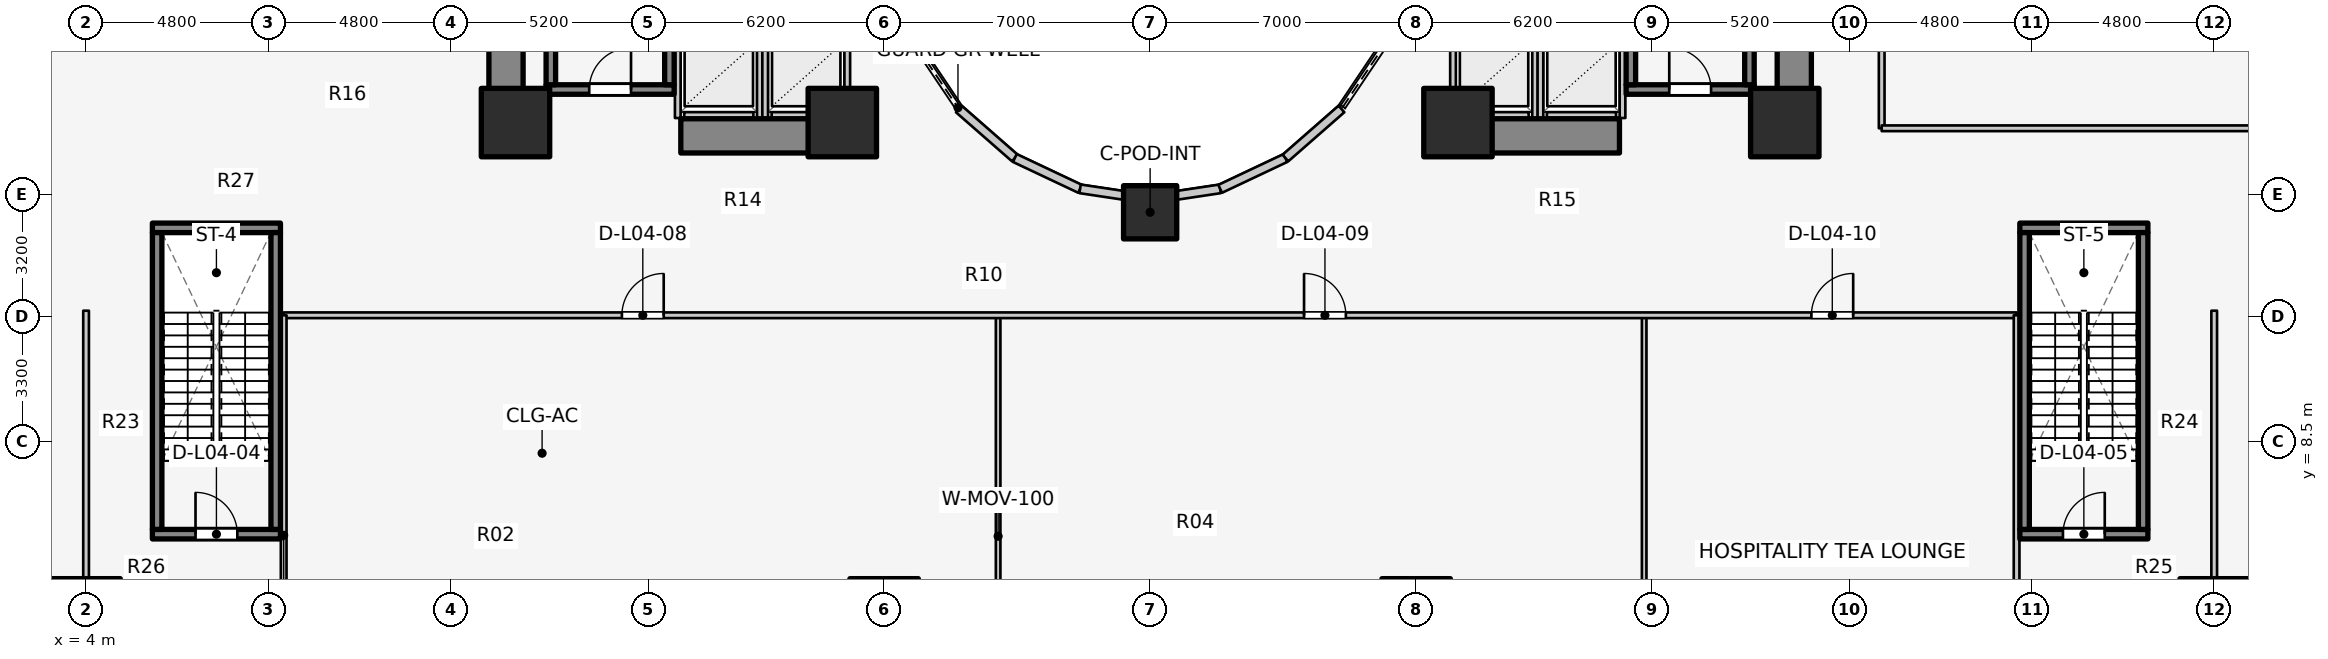
"""IFC4 building model, lengths in metres.
Left out: names, types, materials, properties, quantities, classifications, styles, units other than length and angle.
Written with IfcOpenShell. Run it as: python <this file> out.ifc"""

import sys

from ifc_helpers import new_model, si_unit, direction, frame, frame_2d, origin, origin_2d, place, context, subcontext, project, spatial, rectangle, extrude, element, fill, save


model = new_model("IFC4")
c1 = context("Model", 3, precision=1e-05, world=origin(), true_north=direction((0.0, 1.0)))
c2 = subcontext(c1, "Body", "Model", "MODEL_VIEW")
j1 = project(units=[si_unit("LENGTHUNIT", "METRE"), si_unit("PLANEANGLEUNIT", "RADIAN")], contexts=[c1])
p1 = place(None, origin())
s1 = spatial("IfcSite", under=j1, at=p1, CompositionType="ELEMENT")
p2 = place(p1, origin())
s2 = spatial("IfcBuilding", under=s1, at=p2, CompositionType="ELEMENT")
p3 = place(p2, frame((0.0, 0.0, 13.8)))
s3 = spatial("IfcBuildingStorey", under=s2, at=p3, CompositionType="ELEMENT", Elevation=13.8)
p4 = place(p3, frame((15.05, 17.05, 0.0), z_axis=(0.0, 0.0, 1.0), x_axis=(0.0, 1.0, 0.0)))
e1 = element("IfcWall", 1, at=p4, inside=s3, PredefinedType="SHEAR", context=c2, shape_type="SweptSolid", body=[
    extrude(rectangle(XDim=12.8, YDim=0.9, at=frame_2d((6.4, 0.0))), origin(), (0.0, 0.0, 1.0), 4.6),
])
p5 = place(p3, frame((19.65, 16.55, 0.0), z_axis=(0.0, 0.0, 1.0), x_axis=(1.0, 0.0, 0.0)))
e2 = element("IfcWall", 2, at=p5, inside=s3, PredefinedType="SHEAR", context=c2, shape_type="SweptSolid", body=[
    extrude(rectangle(XDim=4.5, YDim=0.9, at=frame_2d((2.25, 0.0))), origin(), (0.0, 0.0, 1.0), 4.6),
])
p6 = place(p3, frame((48.95, 17.05, 0.0), z_axis=(0.0, 0.0, 1.0), x_axis=(0.0, 1.0, 0.0)))
e3 = element("IfcWall", 3, at=p6, inside=s3, PredefinedType="SHEAR", context=c2, shape_type="SweptSolid", body=[
    extrude(rectangle(XDim=12.8, YDim=0.9, at=frame_2d((6.4, 0.0))), origin(), (0.0, 0.0, 1.0), 4.6),
])
p7 = place(p3, frame((39.85, 16.55, 0.0), z_axis=(0.0, 0.0, 1.0), x_axis=(1.0, 0.0, 0.0)))
e4 = element("IfcWall", 4, at=p7, inside=s3, PredefinedType="SHEAR", context=c2, shape_type="SweptSolid", body=[
    extrude(rectangle(XDim=4.5, YDim=0.9, at=frame_2d((2.25, 0.0))), origin(), (0.0, 0.0, 1.0), 4.6),
])
p8 = place(p3, frame((16.105, 17.77, 0.0), z_axis=(0.0, 0.0, 1.0), x_axis=(1.0, 0.0, 0.0)))
e5 = element("IfcWall", 5, at=p8, inside=s3, PredefinedType="SOLIDWALL", context=c2, shape_type="SweptSolid", body=[
    extrude(rectangle(XDim=3.37, YDim=0.25, at=frame_2d((1.685, 0.0))), origin(), (0.0, 0.0, 1.0), 4.6),
])
p9 = place(p8, frame((1.135, 0.0, 0.0)))
e6 = element("IfcOpeningElement", 6, at=p9, cuts=e5, PredefinedType="OPENING", context=c2, shape_type="SweptSolid", body=[
    extrude(rectangle(XDim=1.1, YDim=2.1, at=frame_2d((0.55, 1.05))), frame((0.0, 0.135, 0.0), z_axis=(0.0, -1.0, 0.0), x_axis=(1.0, 0.0, 0.0)), (0.0, 0.0, 1.0), 0.27),
])
for number, where, z_axis, x_axis in (
    (7, (16.23, 17.895, 0.0), (0.0, 0.0, 1.0), (0.0, 1.0, 0.0)),
    (8, (19.35, 17.895, 0.0), (0.0, 0.0, 1.0), (0.0, 1.0, 0.0)),
):
    element("IfcWall", number, at=place(p3, frame(where, z_axis=z_axis, x_axis=x_axis)), inside=s3, PredefinedType="SOLIDWALL", context=c2, shape_type="SweptSolid", body=[
        extrude(rectangle(XDim=7.81, YDim=0.25, at=frame_2d((3.905, 0.0))), origin(), (0.0, 0.0, 1.0), 4.6),
    ])
p10 = place(p3, frame((44.525, 17.77, 0.0), z_axis=(0.0, 0.0, 1.0), x_axis=(1.0, 0.0, 0.0)))
e9 = element("IfcWall", 9, at=p10, inside=s3, PredefinedType="SOLIDWALL", context=c2, shape_type="SweptSolid", body=[
    extrude(rectangle(XDim=3.37, YDim=0.25, at=frame_2d((1.685, 0.0))), origin(), (0.0, 0.0, 1.0), 4.6),
])
p11 = place(p10, frame((1.135, 0.0, 0.0)))
e10 = element("IfcOpeningElement", 10, at=p11, cuts=e9, PredefinedType="OPENING", context=c2, shape_type="SweptSolid", body=[
    extrude(rectangle(XDim=1.1, YDim=2.1, at=frame_2d((0.55, 1.05))), frame((0.0, 0.135, 0.0), z_axis=(0.0, -1.0, 0.0), x_axis=(1.0, 0.0, 0.0)), (0.0, 0.0, 1.0), 0.27),
])
for number, where, z_axis, x_axis in (
    (11, (44.65, 17.895, 0.0), (0.0, 0.0, 1.0), (0.0, 1.0, 0.0)),
    (12, (47.77, 17.895, 0.0), (0.0, 0.0, 1.0), (0.0, 1.0, 0.0)),
):
    element("IfcWall", number, at=place(p3, frame(where, z_axis=z_axis, x_axis=x_axis)), inside=s3, PredefinedType="SOLIDWALL", context=c2, shape_type="SweptSolid", body=[
        extrude(rectangle(XDim=7.81, YDim=0.25, at=frame_2d((3.905, 0.0))), origin(), (0.0, 0.0, 1.0), 4.6),
    ])
p12 = place(p3, frame((5.745, 6.07, 0.0), z_axis=(0.0, 0.0, 1.0), x_axis=(1.0, 0.0, 0.0)))
e13 = element("IfcWall", 13, at=p12, inside=s3, PredefinedType="SOLIDWALL", context=c2, shape_type="SweptSolid", body=[
    extrude(rectangle(XDim=3.37, YDim=0.25, at=frame_2d((1.685, 0.0))), origin(), (0.0, 0.0, 1.0), 4.6),
])
p13 = place(p12, frame((1.135, 0.0, 0.0)))
e14 = element("IfcOpeningElement", 14, at=p13, cuts=e13, PredefinedType="OPENING", context=c2, shape_type="SweptSolid", body=[
    extrude(rectangle(XDim=1.1, YDim=2.1, at=frame_2d((0.55, 1.05))), frame((0.0, 0.135, 0.0), z_axis=(0.0, -1.0, 0.0), x_axis=(1.0, 0.0, 0.0)), (0.0, 0.0, 1.0), 0.27),
])
p14 = place(p3, frame((5.745, 14.13, 0.0), z_axis=(0.0, 0.0, 1.0), x_axis=(1.0, 0.0, 0.0)))
e15 = element("IfcWall", 15, at=p14, inside=s3, PredefinedType="SOLIDWALL", context=c2, shape_type="SweptSolid", body=[
    extrude(rectangle(XDim=3.37, YDim=0.25, at=frame_2d((1.685, 0.0))), origin(), (0.0, 0.0, 1.0), 4.6),
])
for number, where, z_axis, x_axis in (
    (16, (5.87, 6.195, 0.0), (0.0, 0.0, 1.0), (0.0, 1.0, 0.0)),
    (17, (8.99, 6.195, 0.0), (0.0, 0.0, 1.0), (0.0, 1.0, 0.0)),
):
    element("IfcWall", number, at=place(p3, frame(where, z_axis=z_axis, x_axis=x_axis)), inside=s3, PredefinedType="SOLIDWALL", context=c2, shape_type="SweptSolid", body=[
        extrude(rectangle(XDim=7.81, YDim=0.25, at=frame_2d((3.905, 0.0))), origin(), (0.0, 0.0, 1.0), 4.6),
    ])
p15 = place(p3, frame((54.885, 6.07, 0.0), z_axis=(0.0, 0.0, 1.0), x_axis=(1.0, 0.0, 0.0)))
e18 = element("IfcWall", 18, at=p15, inside=s3, PredefinedType="SOLIDWALL", context=c2, shape_type="SweptSolid", body=[
    extrude(rectangle(XDim=3.37, YDim=0.25, at=frame_2d((1.685, 0.0))), origin(), (0.0, 0.0, 1.0), 4.6),
])
p16 = place(p15, frame((1.135, 0.0, 0.0)))
e19 = element("IfcOpeningElement", 19, at=p16, cuts=e18, PredefinedType="OPENING", context=c2, shape_type="SweptSolid", body=[
    extrude(rectangle(XDim=1.1, YDim=2.1, at=frame_2d((0.55, 1.05))), frame((0.0, 0.135, 0.0), z_axis=(0.0, -1.0, 0.0), x_axis=(1.0, 0.0, 0.0)), (0.0, 0.0, 1.0), 0.27),
])
p17 = place(p3, frame((54.885, 14.13, 0.0), z_axis=(0.0, 0.0, 1.0), x_axis=(1.0, 0.0, 0.0)))
e20 = element("IfcWall", 20, at=p17, inside=s3, PredefinedType="SOLIDWALL", context=c2, shape_type="SweptSolid", body=[
    extrude(rectangle(XDim=3.37, YDim=0.25, at=frame_2d((1.685, 0.0))), origin(), (0.0, 0.0, 1.0), 4.6),
])
for number, where, z_axis, x_axis in (
    (21, (55.01, 6.195, 0.0), (0.0, 0.0, 1.0), (0.0, 1.0, 0.0)),
    (22, (58.13, 6.195, 0.0), (0.0, 0.0, 1.0), (0.0, 1.0, 0.0)),
):
    element("IfcWall", number, at=place(p3, frame(where, z_axis=z_axis, x_axis=x_axis)), inside=s3, PredefinedType="SOLIDWALL", context=c2, shape_type="SweptSolid", body=[
        extrude(rectangle(XDim=7.81, YDim=0.25, at=frame_2d((3.905, 0.0))), origin(), (0.0, 0.0, 1.0), 4.6),
    ])
for number, where, z_axis, x_axis in (
    (23, (15.3, 16.9, 0.0), (0.0, 0.0, 1.0), (1.0, 0.0, 0.0)),
    (24, (23.9, 16.9, 0.0), (0.0, 0.0, 1.0), (1.0, 0.0, 0.0)),
    (25, (40.1, 16.9, 0.0), (0.0, 0.0, 1.0), (1.0, 0.0, 0.0)),
    (26, (48.7, 16.9, 0.0), (0.0, 0.0, 1.0), (1.0, 0.0, 0.0)),
    (27, (4.0, 4.0, 0.0), (0.0, 0.0, 1.0), (1.0, 0.0, 0.0)),
    (28, (25.0, 4.0, 0.0), (0.0, 0.0, 1.0), (1.0, 0.0, 0.0)),
    (29, (39.0, 4.0, 0.0), (0.0, 0.0, 1.0), (1.0, 0.0, 0.0)),
    (30, (60.0, 4.0, 0.0), (0.0, 0.0, 1.0), (1.0, 0.0, 0.0)),
):
    element("IfcColumn", number, at=place(p3, frame(where, z_axis=z_axis, x_axis=x_axis)), inside=s3, PredefinedType="COLUMN", context=c2, shape_type="SweptSolid", body=[
        extrude(rectangle(XDim=1.8, YDim=1.8, at=origin_2d()), origin(), (0.0, 0.0, 1.0), 4.6),
    ])
p18 = place(p3, frame((32.0, 14.54, 0.0), z_axis=(0.0, 0.0, 1.0), x_axis=(1.0, 0.0, 0.0)))
e31 = element("IfcColumn", 31, at=p18, inside=s3, PredefinedType="COLUMN", context=c2, shape_type="SweptSolid", body=[
    extrude(rectangle(XDim=1.4, YDim=1.4, at=origin_2d()), origin(), (0.0, 0.0, 1.0), 4.6),
])
p19 = place(p3, frame((26.965, 17.258, 0.0), z_axis=(0.0, 0.0, 1.0), x_axis=(0.752576694707, -0.658504607869, 0.0)))
e32 = element("IfcWall", 32, at=p19, inside=s3, PredefinedType="STANDARD", context=c2, shape_type="SweptSolid", body=[
    extrude(rectangle(XDim=1.959, YDim=0.23, at=frame_2d((0.98, 0.0))), origin(), (0.0, 0.0, 1.0), 3.28),
])
p20 = place(p3, frame((28.44, 15.968, 0.0), z_axis=(0.0, 0.0, 1.0), x_axis=(0.904179699603, -0.427152280606, 0.0)))
e33 = element("IfcWall", 33, at=p20, inside=s3, PredefinedType="STANDARD", context=c2, shape_type="SweptSolid", body=[
    extrude(rectangle(XDim=1.899, YDim=0.23, at=frame_2d((0.95, 0.0))), origin(), (0.0, 0.0, 1.0), 3.28),
])
for number, where, z_axis, x_axis in (
    (34, (30.157, 15.157, 0.0), (0.0, 0.0, 1.0), (0.989, -0.149, 0.0)),
    (35, (32.0, 14.88, 0.0), (0.0, 0.0, 1.0), (0.989, 0.149, 0.0)),
):
    element("IfcWall", number, at=place(p3, frame(where, z_axis=z_axis, x_axis=x_axis)), inside=s3, PredefinedType="STANDARD", context=c2, shape_type="SweptSolid", body=[
        extrude(rectangle(XDim=1.864, YDim=0.23, at=frame_2d((0.932, 0.0))), origin(), (0.0, 0.0, 1.0), 3.28),
    ])
p21 = place(p3, frame((33.843, 15.157, 0.0), z_axis=(0.0, 0.0, 1.0), x_axis=(0.904179699603, 0.427152280606, 0.0)))
e36 = element("IfcWall", 36, at=p21, inside=s3, PredefinedType="STANDARD", context=c2, shape_type="SweptSolid", body=[
    extrude(rectangle(XDim=1.899, YDim=0.23, at=frame_2d((0.95, 0.0))), origin(), (0.0, 0.0, 1.0), 3.28),
])
p22 = place(p3, frame((35.56, 15.968, 0.0), z_axis=(0.0, 0.0, 1.0), x_axis=(0.752576694707, 0.658504607869, 0.0)))
e37 = element("IfcWall", 37, at=p22, inside=s3, PredefinedType="STANDARD", context=c2, shape_type="SweptSolid", body=[
    extrude(rectangle(XDim=1.959, YDim=0.23, at=frame_2d((0.98, 0.0))), origin(), (0.0, 0.0, 1.0), 3.28),
])
p23 = place(p3, frame((19.74, 17.1, 0.0), z_axis=(0.0, 0.0, 1.0), x_axis=(1.0, 0.0, 0.0)))
e38 = element("IfcWall", 38, at=p23, inside=s3, PredefinedType="SOLIDWALL", context=c2, shape_type="SweptSolid", body=[
    extrude(rectangle(XDim=1.82, YDim=0.15, at=frame_2d((0.91, 0.0))), origin(), (0.0, 0.0, 1.0), 4.255),
])
p24 = place(p3, frame((19.57, 17.02, 0.0), z_axis=(0.0, 0.0, 1.0), x_axis=(0.0, 1.0, 0.0)))
e39 = element("IfcWall", 39, at=p24, inside=s3, PredefinedType="SOLIDWALL", context=c2, shape_type="SweptSolid", body=[
    extrude(rectangle(XDim=2.22, YDim=0.15, at=frame_2d((1.11, 0.0))), origin(), (0.0, 0.0, 1.0), 3.62),
])
p25 = place(p3, frame((21.73, 17.02, 0.0), z_axis=(0.0, 0.0, 1.0), x_axis=(0.0, 1.0, 0.0)))
e40 = element("IfcWall", 40, at=p25, inside=s3, PredefinedType="SOLIDWALL", context=c2, shape_type="SweptSolid", body=[
    extrude(rectangle(XDim=2.22, YDim=0.15, at=frame_2d((1.11, 0.0))), origin(), (0.0, 0.0, 1.0), 4.255),
])
p26 = place(p3, frame((22.04, 17.1, 0.0), z_axis=(0.0, 0.0, 1.0), x_axis=(1.0, 0.0, 0.0)))
e41 = element("IfcWall", 41, at=p26, inside=s3, PredefinedType="SOLIDWALL", context=c2, shape_type="SweptSolid", body=[
    extrude(rectangle(XDim=1.82, YDim=0.15, at=frame_2d((0.91, 0.0))), origin(), (0.0, 0.0, 1.0), 3.62),
])
p27 = place(p3, frame((21.87, 17.02, 0.0), z_axis=(0.0, 0.0, 1.0), x_axis=(0.0, 1.0, 0.0)))
e42 = element("IfcWall", 42, at=p27, inside=s3, PredefinedType="SOLIDWALL", context=c2, shape_type="SweptSolid", body=[
    extrude(rectangle(XDim=2.22, YDim=0.15, at=frame_2d((1.11, 0.0))), origin(), (0.0, 0.0, 1.0), 4.255),
])
p28 = place(p3, frame((24.03, 17.02, 0.0), z_axis=(0.0, 0.0, 1.0), x_axis=(0.0, 1.0, 0.0)))
e43 = element("IfcWall", 43, at=p28, inside=s3, PredefinedType="SOLIDWALL", context=c2, shape_type="SweptSolid", body=[
    extrude(rectangle(XDim=2.22, YDim=0.15, at=frame_2d((1.11, 0.0))), origin(), (0.0, 0.0, 1.0), 3.3),
])
p29 = place(p3, frame((40.14, 17.1, 0.0), z_axis=(0.0, 0.0, 1.0), x_axis=(1.0, 0.0, 0.0)))
e44 = element("IfcWall", 44, at=p29, inside=s3, PredefinedType="SOLIDWALL", context=c2, shape_type="SweptSolid", body=[
    extrude(rectangle(XDim=1.82, YDim=0.15, at=frame_2d((0.91, 0.0))), origin(), (0.0, 0.0, 1.0), 3.62),
])
p30 = place(p3, frame((39.97, 17.02, 0.0), z_axis=(0.0, 0.0, 1.0), x_axis=(0.0, 1.0, 0.0)))
e45 = element("IfcWall", 45, at=p30, inside=s3, PredefinedType="SOLIDWALL", context=c2, shape_type="SweptSolid", body=[
    extrude(rectangle(XDim=2.22, YDim=0.15, at=frame_2d((1.11, 0.0))), origin(), (0.0, 0.0, 1.0), 3.3),
])
p31 = place(p3, frame((42.13, 17.02, 0.0), z_axis=(0.0, 0.0, 1.0), x_axis=(0.0, 1.0, 0.0)))
e46 = element("IfcWall", 46, at=p31, inside=s3, PredefinedType="SOLIDWALL", context=c2, shape_type="SweptSolid", body=[
    extrude(rectangle(XDim=2.22, YDim=0.15, at=frame_2d((1.11, 0.0))), origin(), (0.0, 0.0, 1.0), 4.255),
])
p32 = place(p3, frame((42.44, 17.1, 0.0), z_axis=(0.0, 0.0, 1.0), x_axis=(1.0, 0.0, 0.0)))
e47 = element("IfcWall", 47, at=p32, inside=s3, PredefinedType="SOLIDWALL", context=c2, shape_type="SweptSolid", body=[
    extrude(rectangle(XDim=1.82, YDim=0.15, at=frame_2d((0.91, 0.0))), origin(), (0.0, 0.0, 1.0), 4.255),
])
p33 = place(p3, frame((42.27, 17.02, 0.0), z_axis=(0.0, 0.0, 1.0), x_axis=(0.0, 1.0, 0.0)))
e48 = element("IfcWall", 48, at=p33, inside=s3, PredefinedType="SOLIDWALL", context=c2, shape_type="SweptSolid", body=[
    extrude(rectangle(XDim=2.22, YDim=0.15, at=frame_2d((1.11, 0.0))), origin(), (0.0, 0.0, 1.0), 4.255),
])
p34 = place(p3, frame((44.43, 17.02, 0.0), z_axis=(0.0, 0.0, 1.0), x_axis=(0.0, 1.0, 0.0)))
e49 = element("IfcWall", 49, at=p34, inside=s3, PredefinedType="SOLIDWALL", context=c2, shape_type="SweptSolid", body=[
    extrude(rectangle(XDim=2.22, YDim=0.15, at=frame_2d((1.11, 0.0))), origin(), (0.0, 0.0, 1.0), 3.62),
])
for number, where, z_axis, x_axis in (
    (50, (28.0, 0.25, 0.0), (0.0, 0.0, 1.0), (0.0, 1.0, 0.0)),
    (51, (45.0, 0.25, 0.0), (0.0, 0.0, 1.0), (0.0, 1.0, 0.0)),
):
    element("IfcWall", number, at=place(p3, frame(where, z_axis=z_axis, x_axis=x_axis)), inside=s3, PredefinedType="MOVABLE", context=c2, shape_type="SweptSolid", body=[
        extrude(rectangle(XDim=11.53, YDim=0.12, at=frame_2d((5.765, 0.0))), origin(), (0.0, 0.0, 1.0), 3.3),
    ])
p35 = place(p3, frame((9.2, 11.83, 0.0), z_axis=(0.0, 0.0, 1.0), x_axis=(1.0, 0.0, 0.0)))
e52 = element("IfcWall", 52, at=p35, inside=s3, PredefinedType="PARTITIONING", context=c2, shape_type="SweptSolid", body=[
    extrude(rectangle(XDim=45.6, YDim=0.15, at=frame_2d((22.8, 0.0))), origin(), (0.0, 0.0, 1.0), 3.3),
])
p36 = place(p35, frame((8.9, 0.0, 0.0)))
e53 = element("IfcOpeningElement", 53, at=p36, cuts=e52, PredefinedType="OPENING", context=c2, shape_type="SweptSolid", body=[
    extrude(rectangle(XDim=1.1, YDim=2.1, at=frame_2d((0.55, 1.05))), frame((0.0, 0.085, 0.0), z_axis=(0.0, -1.0, 0.0), x_axis=(1.0, 0.0, 0.0)), (0.0, 0.0, 1.0), 0.17),
])
p37 = place(p35, frame((26.85, 0.0, 0.0)))
e54 = element("IfcOpeningElement", 54, at=p37, cuts=e52, PredefinedType="OPENING", context=c2, shape_type="SweptSolid", body=[
    extrude(rectangle(XDim=1.1, YDim=2.1, at=frame_2d((0.55, 1.05))), frame((0.0, 0.085, 0.0), z_axis=(0.0, -1.0, 0.0), x_axis=(1.0, 0.0, 0.0)), (0.0, 0.0, 1.0), 0.17),
])
p38 = place(p35, frame((40.2, 0.0, 0.0)))
e55 = element("IfcOpeningElement", 55, at=p38, cuts=e52, PredefinedType="OPENING", context=c2, shape_type="SweptSolid", body=[
    extrude(rectangle(XDim=1.1, YDim=2.1, at=frame_2d((0.55, 1.05))), frame((0.0, 0.085, 0.0), z_axis=(0.0, -1.0, 0.0), x_axis=(1.0, 0.0, 0.0)), (0.0, 0.0, 1.0), 0.17),
])
for number, where, z_axis, x_axis in (
    (56, (9.2, 0.25, 0.0), (0.0, 0.0, 1.0), (0.0, 1.0, 0.0)),
    (57, (54.8, 0.25, 0.0), (0.0, 0.0, 1.0), (0.0, 1.0, 0.0)),
):
    element("IfcWall", number, at=place(p3, frame(where, z_axis=z_axis, x_axis=x_axis)), inside=s3, PredefinedType="PARTITIONING", context=c2, shape_type="SweptSolid", body=[
        extrude(rectangle(XDim=11.58, YDim=0.15, at=frame_2d((5.79, 0.0))), origin(), (0.0, 0.0, 1.0), 3.3),
    ])
p39 = place(p3, frame((51.25, 16.75, 0.0), z_axis=(0.0, 0.0, 1.0), x_axis=(0.0, 1.0, 0.0)))
e58 = element("IfcWall", 58, at=p39, inside=s3, PredefinedType="PARTITIONING", context=c2, shape_type="SweptSolid", body=[
    extrude(rectangle(XDim=13.45, YDim=0.15, at=frame_2d((6.725, 0.0))), origin(), (0.0, 0.0, 1.0), 4.255),
])
p40 = place(p39, frame((6.175, 0.0, 0.0)))
e59 = element("IfcOpeningElement", 59, at=p40, cuts=e58, PredefinedType="OPENING", context=c2, shape_type="SweptSolid", body=[
    extrude(rectangle(XDim=1.1, YDim=2.1, at=frame_2d((0.55, 1.05))), frame((0.0, 0.085, 0.0), z_axis=(0.0, -1.0, 0.0), x_axis=(1.0, 0.0, 0.0)), (0.0, 0.0, 1.0), 0.17),
])
p41 = place(p3, frame((51.25, 16.75, 0.0), z_axis=(0.0, 0.0, 1.0), x_axis=(1.0, 0.0, 0.0)))
e60 = element("IfcWall", 60, at=p41, inside=s3, PredefinedType="PARTITIONING", context=c2, shape_type="SweptSolid", body=[
    extrude(rectangle(XDim=12.53, YDim=0.15, at=frame_2d((6.265, 0.0))), origin(), (0.0, 0.0, 1.0), 3.3),
])
for number, where, z_axis, x_axis in (
    (61, (4.0, 4.2, 0.0), (0.0, 0.0, 1.0), (0.0, 1.0, 0.0)),
    (62, (60.0, 4.2, 0.0), (0.0, 0.0, 1.0), (0.0, 1.0, 0.0)),
):
    element("IfcWall", number, at=place(p3, frame(where, z_axis=z_axis, x_axis=x_axis)), inside=s3, PredefinedType="PARTITIONING", context=c2, shape_type="SweptSolid", body=[
        extrude(rectangle(XDim=7.75, YDim=0.15, at=frame_2d((3.875, 0.0))), origin(), (0.0, 0.0, 1.0), 3.3),
    ])
p42 = place(p9, origin())
e63 = element("IfcDoor", 63, at=p42, inside=s3, OperationType="SINGLE_SWING_RIGHT", PredefinedType="DOOR", context=c2, shape_type="SweptSolid", body=[
    extrude(rectangle(XDim=1.1, YDim=2.1, at=frame_2d((0.55, 1.05))), frame((0.0, 0.025, 0.0), z_axis=(0.0, -1.0, 0.0), x_axis=(1.0, 0.0, 0.0)), (0.0, 0.0, 1.0), 0.05),
])
fill(e6, e63)
p43 = place(p11, origin())
e64 = element("IfcDoor", 64, at=p43, inside=s3, OperationType="SINGLE_SWING_LEFT", PredefinedType="DOOR", context=c2, shape_type="SweptSolid", body=[
    extrude(rectangle(XDim=1.1, YDim=2.1, at=frame_2d((0.55, 1.05))), frame((0.0, 0.025, 0.0), z_axis=(0.0, -1.0, 0.0), x_axis=(1.0, 0.0, 0.0)), (0.0, 0.0, 1.0), 0.05),
])
fill(e10, e64)
p44 = place(p13, origin())
e65 = element("IfcDoor", 65, at=p44, inside=s3, OperationType="SINGLE_SWING_LEFT", PredefinedType="DOOR", context=c2, shape_type="SweptSolid", body=[
    extrude(rectangle(XDim=1.1, YDim=2.1, at=frame_2d((0.55, 1.05))), frame((0.0, 0.025, 0.0), z_axis=(0.0, -1.0, 0.0), x_axis=(1.0, 0.0, 0.0)), (0.0, 0.0, 1.0), 0.05),
])
fill(e14, e65)
p45 = place(p16, origin())
e66 = element("IfcDoor", 66, at=p45, inside=s3, OperationType="SINGLE_SWING_RIGHT", PredefinedType="DOOR", context=c2, shape_type="SweptSolid", body=[
    extrude(rectangle(XDim=1.1, YDim=2.1, at=frame_2d((0.55, 1.05))), frame((0.0, 0.025, 0.0), z_axis=(0.0, -1.0, 0.0), x_axis=(1.0, 0.0, 0.0)), (0.0, 0.0, 1.0), 0.05),
])
fill(e19, e66)
p46 = place(p36, origin())
e67 = element("IfcDoor", 67, at=p46, inside=s3, OperationType="SINGLE_SWING_RIGHT", PredefinedType="DOOR", context=c2, shape_type="SweptSolid", body=[
    extrude(rectangle(XDim=1.1, YDim=2.1, at=frame_2d((0.55, 1.05))), frame((0.0, 0.025, 0.0), z_axis=(0.0, -1.0, 0.0), x_axis=(1.0, 0.0, 0.0)), (0.0, 0.0, 1.0), 0.05),
])
fill(e53, e67)
p47 = place(p37, origin())
e68 = element("IfcDoor", 68, at=p47, inside=s3, OperationType="SINGLE_SWING_LEFT", PredefinedType="DOOR", context=c2, shape_type="SweptSolid", body=[
    extrude(rectangle(XDim=1.1, YDim=2.1, at=frame_2d((0.55, 1.05))), frame((0.0, 0.025, 0.0), z_axis=(0.0, -1.0, 0.0), x_axis=(1.0, 0.0, 0.0)), (0.0, 0.0, 1.0), 0.05),
])
fill(e54, e68)
p48 = place(p38, origin())
e69 = element("IfcDoor", 69, at=p48, inside=s3, OperationType="SINGLE_SWING_RIGHT", PredefinedType="DOOR", context=c2, shape_type="SweptSolid", body=[
    extrude(rectangle(XDim=1.1, YDim=2.1, at=frame_2d((0.55, 1.05))), frame((0.0, 0.025, 0.0), z_axis=(0.0, -1.0, 0.0), x_axis=(1.0, 0.0, 0.0)), (0.0, 0.0, 1.0), 0.05),
])
fill(e55, e69)
save(model, sys.argv[1])
